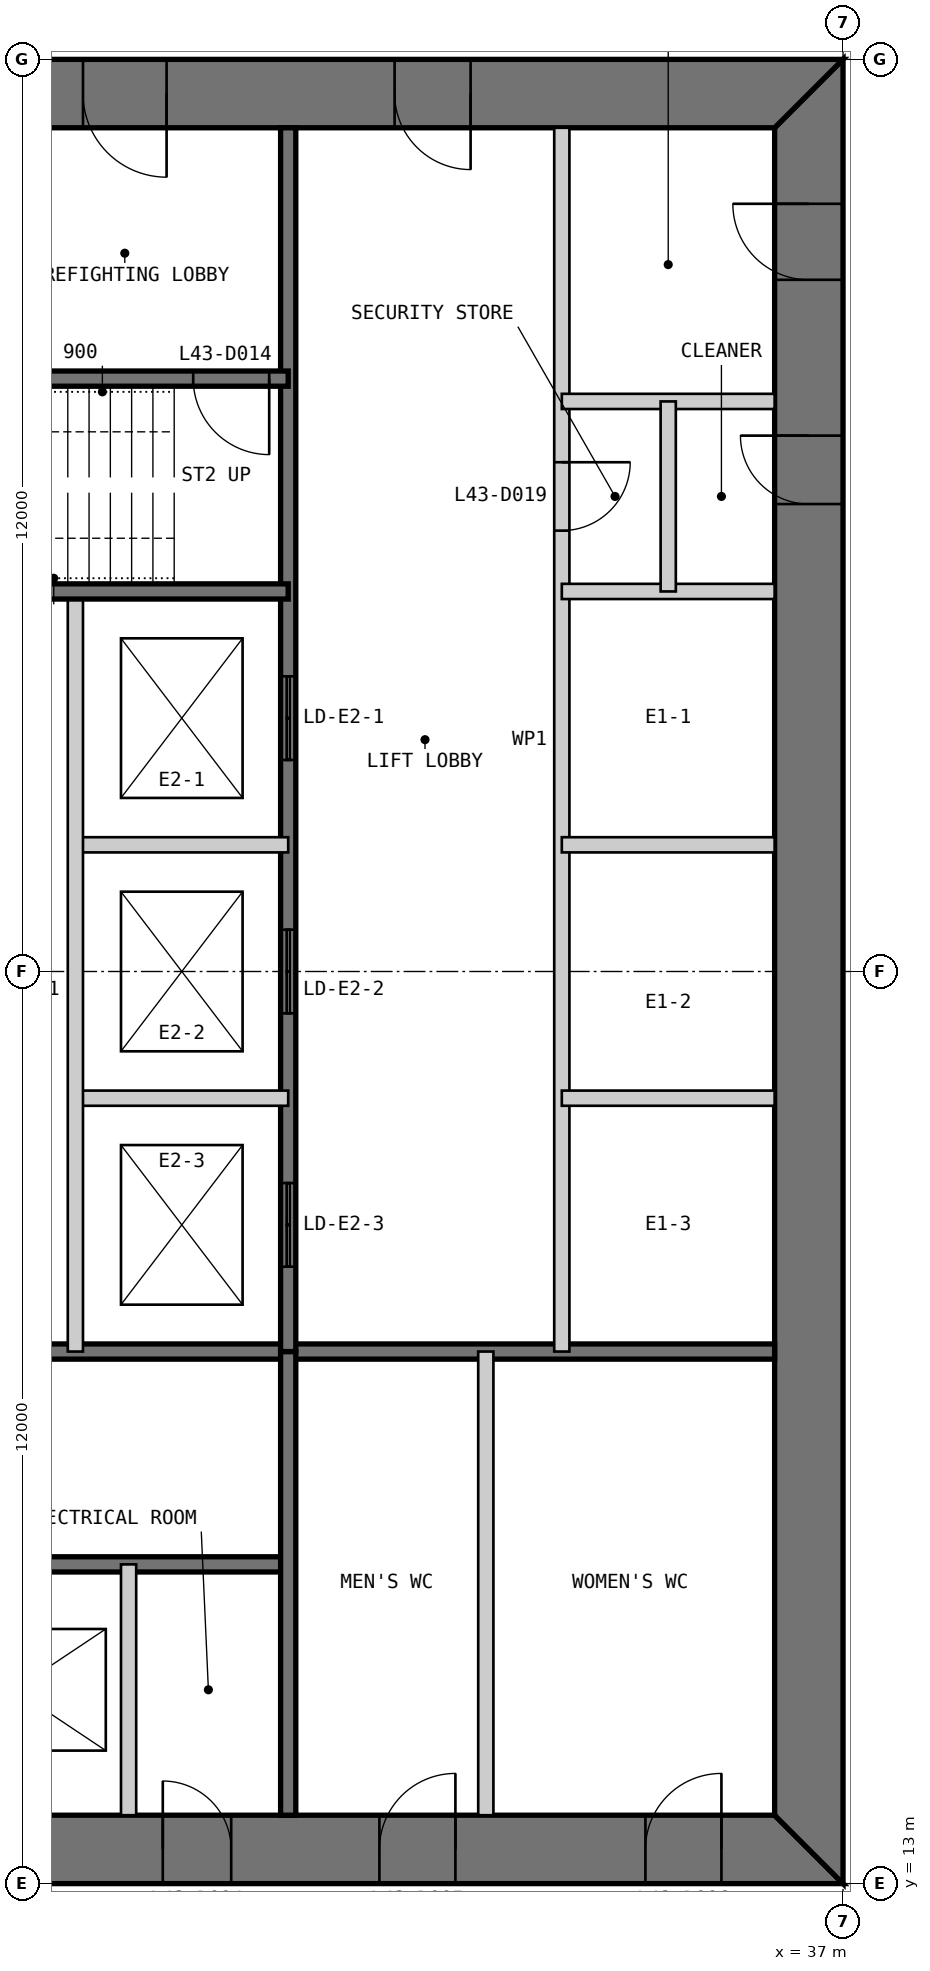
"""IFC4 building model, lengths in metres.
Left out: names, types, materials, properties, quantities, classifications, styles, units other than length and angle.
Written with IfcOpenShell. Run it as: python <this file> out.ifc"""

import sys

from ifc_helpers import new_model, si_unit, direction, frame, frame_2d, origin, place, context, subcontext, project, spatial, polyline, rectangle, outline, extrude, element, fill, save


model = new_model("IFC4")
c1 = context("Model", 3, precision=1e-05, world=origin(), true_north=direction((0.0, 1.0)))
c2 = subcontext(c1, "Body", "Model", "MODEL_VIEW")
j1 = project(units=[si_unit("LENGTHUNIT", "METRE"), si_unit("PLANEANGLEUNIT", "RADIAN")], contexts=[c1])
p1 = place(None, origin())
s1 = spatial("IfcSite", under=j1, at=p1, CompositionType="ELEMENT")
p2 = place(p1, origin())
s2 = spatial("IfcBuilding", under=s1, at=p2, CompositionType="ELEMENT")
p3 = place(p2, frame((0.0, 0.0, 185.8)))
s3 = spatial("IfcBuildingStorey", under=s2, at=p3, CompositionType="ELEMENT", Elevation=185.8)
p4 = place(p3, frame((13.0, 13.45, 0.0), z_axis=(0.0, 0.0, 1.0), x_axis=(1.0, 0.0, 0.0)))
e1 = element("IfcWall", 1, at=p4, inside=s3, PredefinedType="SHEAR", context=c2, shape_type="SweptSolid", body=[
    extrude(outline(polyline([(0.0, -0.45), (24.0, -0.45), (23.1, 0.45), (0.9, 0.45), (0.0, -0.45)])), origin(), (0.0, 0.0, 1.0), 4.0),
])
p5 = place(p4, frame((4.9, 0.0, 0.0)))
e2 = element("IfcOpeningElement", 2, at=p5, cuts=e1, PredefinedType="OPENING", context=c2, shape_type="SweptSolid", body=[
    extrude(rectangle(XDim=1.0, YDim=2.2, at=frame_2d((0.5, 1.1))), frame((0.0, 0.46, 0.0), z_axis=(0.0, -1.0, 0.0), x_axis=(1.0, 0.0, 0.0)), (0.0, 0.0, 1.0), 0.92),
])
p6 = place(p4, frame((8.9, 0.0, 0.0)))
e3 = element("IfcOpeningElement", 3, at=p6, cuts=e1, PredefinedType="OPENING", context=c2, shape_type="SweptSolid", body=[
    extrude(rectangle(XDim=1.1, YDim=2.2, at=frame_2d((0.55, 1.1))), frame((0.0, 0.46, 0.0), z_axis=(0.0, -1.0, 0.0), x_axis=(1.0, 0.0, 0.0)), (0.0, 0.0, 1.0), 0.92),
])
p7 = place(p4, frame((15.05, 0.0, 0.0)))
e4 = element("IfcOpeningElement", 4, at=p7, cuts=e1, PredefinedType="OPENING", context=c2, shape_type="SweptSolid", body=[
    extrude(rectangle(XDim=0.9, YDim=2.2, at=frame_2d((0.45, 1.1))), frame((0.0, 0.46, 0.0), z_axis=(0.0, -1.0, 0.0), x_axis=(1.0, 0.0, 0.0)), (0.0, 0.0, 1.0), 0.92),
])
p8 = place(p4, frame((17.9, 0.0, 0.0)))
e5 = element("IfcOpeningElement", 5, at=p8, cuts=e1, PredefinedType="OPENING", context=c2, shape_type="SweptSolid", body=[
    extrude(rectangle(XDim=1.0, YDim=2.2, at=frame_2d((0.5, 1.1))), frame((0.0, 0.46, 0.0), z_axis=(0.0, -1.0, 0.0), x_axis=(1.0, 0.0, 0.0)), (0.0, 0.0, 1.0), 0.92),
])
p9 = place(p4, frame((21.4, 0.0, 0.0)))
e6 = element("IfcOpeningElement", 6, at=p9, cuts=e1, PredefinedType="OPENING", context=c2, shape_type="SweptSolid", body=[
    extrude(rectangle(XDim=1.0, YDim=2.2, at=frame_2d((0.5, 1.1))), frame((0.0, 0.46, 0.0), z_axis=(0.0, -1.0, 0.0), x_axis=(1.0, 0.0, 0.0)), (0.0, 0.0, 1.0), 0.92),
])
p10 = place(p3, frame((36.55, 13.9, 0.0), z_axis=(0.0, 0.0, 1.0), x_axis=(0.0, 1.0, 0.0)))
e7 = element("IfcWall", 7, at=p10, inside=s3, PredefinedType="SHEAR", context=c2, shape_type="SweptSolid", body=[
    extrude(outline(polyline([(-0.9, -0.45), (23.1, -0.45), (22.2, 0.45), (0.0, 0.45), (-0.9, -0.45)])), origin(), (0.0, 0.0, 1.0), 4.0),
])
p11 = place(p10, frame((20.2, 0.0, 0.0)))
e8 = element("IfcOpeningElement", 8, at=p11, cuts=e7, PredefinedType="OPENING", context=c2, shape_type="SweptSolid", body=[
    extrude(rectangle(XDim=1.0, YDim=2.2, at=frame_2d((0.5, 1.1))), frame((0.0, 0.46, 0.0), z_axis=(0.0, -1.0, 0.0), x_axis=(1.0, 0.0, 0.0)), (0.0, 0.0, 1.0), 0.92),
])
p12 = place(p10, frame((17.25, 0.0, 0.0)))
e9 = element("IfcOpeningElement", 9, at=p12, cuts=e7, PredefinedType="OPENING", context=c2, shape_type="SweptSolid", body=[
    extrude(rectangle(XDim=0.9, YDim=2.2, at=frame_2d((0.45, 1.1))), frame((0.0, 0.46, 0.0), z_axis=(0.0, -1.0, 0.0), x_axis=(1.0, 0.0, 0.0)), (0.0, 0.0, 1.0), 0.92),
])
p13 = place(p3, frame((37.0, 36.55, 0.0), z_axis=(0.0, 0.0, 1.0), x_axis=(-1.0, 0.0, 0.0)))
e10 = element("IfcWall", 10, at=p13, inside=s3, PredefinedType="SHEAR", context=c2, shape_type="SweptSolid", body=[
    extrude(outline(polyline([(0.0, -0.45), (24.0, -0.45), (23.1, 0.45), (0.9, 0.45), (0.0, -0.45)])), origin(), (0.0, 0.0, 1.0), 4.0),
])
p14 = place(p13, frame((4.9, 0.0, 0.0)))
e11 = element("IfcOpeningElement", 11, at=p14, cuts=e10, PredefinedType="OPENING", context=c2, shape_type="SweptSolid", body=[
    extrude(rectangle(XDim=1.0, YDim=2.2, at=frame_2d((0.5, 1.1))), frame((0.0, 0.46, 0.0), z_axis=(0.0, -1.0, 0.0), x_axis=(1.0, 0.0, 0.0)), (0.0, 0.0, 1.0), 0.92),
])
p15 = place(p13, frame((8.9, 0.0, 0.0)))
e12 = element("IfcOpeningElement", 12, at=p15, cuts=e10, PredefinedType="OPENING", context=c2, shape_type="SweptSolid", body=[
    extrude(rectangle(XDim=1.1, YDim=2.2, at=frame_2d((0.55, 1.1))), frame((0.0, 0.46, 0.0), z_axis=(0.0, -1.0, 0.0), x_axis=(1.0, 0.0, 0.0)), (0.0, 0.0, 1.0), 0.92),
])
p16 = place(p13, frame((15.05, 0.0, 0.0)))
e13 = element("IfcOpeningElement", 13, at=p16, cuts=e10, PredefinedType="OPENING", context=c2, shape_type="SweptSolid", body=[
    extrude(rectangle(XDim=0.9, YDim=2.2, at=frame_2d((0.45, 1.1))), frame((0.0, 0.46, 0.0), z_axis=(0.0, -1.0, 0.0), x_axis=(1.0, 0.0, 0.0)), (0.0, 0.0, 1.0), 0.92),
])
p17 = place(p13, frame((17.9, 0.0, 0.0)))
e14 = element("IfcOpeningElement", 14, at=p17, cuts=e10, PredefinedType="OPENING", context=c2, shape_type="SweptSolid", body=[
    extrude(rectangle(XDim=1.0, YDim=2.2, at=frame_2d((0.5, 1.1))), frame((0.0, 0.46, 0.0), z_axis=(0.0, -1.0, 0.0), x_axis=(1.0, 0.0, 0.0)), (0.0, 0.0, 1.0), 0.92),
])
p18 = place(p13, frame((21.4, 0.0, 0.0)))
e15 = element("IfcOpeningElement", 15, at=p18, cuts=e10, PredefinedType="OPENING", context=c2, shape_type="SweptSolid", body=[
    extrude(rectangle(XDim=1.0, YDim=2.2, at=frame_2d((0.5, 1.1))), frame((0.0, 0.46, 0.0), z_axis=(0.0, -1.0, 0.0), x_axis=(1.0, 0.0, 0.0)), (0.0, 0.0, 1.0), 0.92),
])
p19 = place(p3, frame((20.3, 17.2, 0.0), z_axis=(0.0, 0.0, 1.0), x_axis=(1.0, 0.0, 0.0)))
e16 = element("IfcWall", 16, at=p19, inside=s3, PredefinedType="SOLIDWALL", context=c2, shape_type="SweptSolid", body=[
    extrude(rectangle(XDim=9.4, YDim=0.2, at=frame_2d((4.7, 0.0))), origin(), (0.0, 0.0, 1.0), 3.8),
])
p20 = place(p19, frame((0.25, 0.0, 0.0)))
e17 = element("IfcOpeningElement", 17, at=p20, cuts=e16, PredefinedType="OPENING", context=c2, shape_type="SweptSolid", body=[
    extrude(rectangle(XDim=1.0, YDim=2.2, at=frame_2d((0.5, 1.1))), frame((0.0, 0.11, 0.0), z_axis=(0.0, -1.0, 0.0), x_axis=(1.0, 0.0, 0.0)), (0.0, 0.0, 1.0), 0.22),
])
p21 = place(p3, frame((20.3, 20.0, 0.0), z_axis=(0.0, 0.0, 1.0), x_axis=(1.0, 0.0, 0.0)))
e18 = element("IfcWall", 18, at=p21, inside=s3, PredefinedType="SOLIDWALL", context=c2, shape_type="SweptSolid", body=[
    extrude(rectangle(XDim=15.8, YDim=0.2, at=frame_2d((7.9, 0.0))), origin(), (0.0, 0.0, 1.0), 3.8),
])
p22 = place(p3, frame((27.6, 13.9, 0.0), z_axis=(0.0, 0.0, 1.0), x_axis=(0.0, 1.0, 0.0)))
e19 = element("IfcWall", 19, at=p22, inside=s3, PredefinedType="PARTITIONING", context=c2, shape_type="SweptSolid", body=[
    extrude(rectangle(XDim=3.3, YDim=0.2, at=frame_2d((1.65, 0.0))), origin(), (0.0, 0.0, 1.0), 3.8),
])
p23 = place(p3, frame((29.7, 13.9, 0.0), z_axis=(0.0, 0.0, 1.0), x_axis=(0.0, 1.0, 0.0)))
e20 = element("IfcWall", 20, at=p23, inside=s3, PredefinedType="SOLIDWALL", context=c2, shape_type="SweptSolid", body=[
    extrude(rectangle(XDim=6.1, YDim=0.2, at=frame_2d((3.05, 0.0))), origin(), (0.0, 0.0, 1.0), 3.8),
])
p24 = place(p3, frame((32.3, 13.9, 0.0), z_axis=(0.0, 0.0, 1.0), x_axis=(0.0, 1.0, 0.0)))
e21 = element("IfcWall", 21, at=p24, inside=s3, PredefinedType="PARTITIONING", context=c2, shape_type="SweptSolid", body=[
    extrude(rectangle(XDim=6.1, YDim=0.2, at=frame_2d((3.05, 0.0))), origin(), (0.0, 0.0, 1.0), 3.8),
])
p25 = place(p3, frame((33.3, 36.1, 0.0), z_axis=(0.0, 0.0, 1.0), x_axis=(0.0, -1.0, 0.0)))
e22 = element("IfcWall", 22, at=p25, inside=s3, PredefinedType="PARTITIONING", context=c2, shape_type="SweptSolid", body=[
    extrude(rectangle(XDim=16.1, YDim=0.2, at=frame_2d((8.05, 0.0))), origin(), (0.0, 0.0, 1.0), 3.8),
])
p26 = place(p25, frame((4.4, 0.0, 0.0)))
e23 = element("IfcOpeningElement", 23, at=p26, cuts=e22, PredefinedType="OPENING", context=c2, shape_type="SweptSolid", body=[
    extrude(rectangle(XDim=0.9, YDim=2.2, at=frame_2d((0.45, 1.1))), frame((0.0, 0.11, 0.0), z_axis=(0.0, -1.0, 0.0), x_axis=(1.0, 0.0, 0.0)), (0.0, 0.0, 1.0), 0.22),
])
p27 = place(p3, frame((29.7, 36.1, 0.0), z_axis=(0.0, 0.0, 1.0), x_axis=(0.0, -1.0, 0.0)))
e24 = element("IfcWall", 24, at=p27, inside=s3, PredefinedType="SOLIDWALL", context=c2, shape_type="SweptSolid", body=[
    extrude(rectangle(XDim=16.1, YDim=0.2, at=frame_2d((8.05, 0.0))), origin(), (0.0, 0.0, 1.0), 3.8),
])
p28 = place(p27, frame((7.217, 0.0, 0.0)))
e25 = element("IfcOpeningElement", 25, at=p28, cuts=e24, PredefinedType="OPENING", context=c2, shape_type="SweptSolid", body=[
    extrude(rectangle(XDim=1.1, YDim=2.2, at=frame_2d((0.55, 1.1))), frame((0.0, 0.11, 0.0), z_axis=(0.0, -1.0, 0.0), x_axis=(1.0, 0.0, 0.0)), (0.0, 0.0, 1.0), 0.22),
])
p29 = place(p27, frame((10.55, 0.0, 0.0)))
e26 = element("IfcOpeningElement", 26, at=p29, cuts=e24, PredefinedType="OPENING", context=c2, shape_type="SweptSolid", body=[
    extrude(rectangle(XDim=1.1, YDim=2.2, at=frame_2d((0.55, 1.1))), frame((0.0, 0.11, 0.0), z_axis=(0.0, -1.0, 0.0), x_axis=(1.0, 0.0, 0.0)), (0.0, 0.0, 1.0), 0.22),
])
p30 = place(p27, frame((13.883, 0.0, 0.0)))
e27 = element("IfcOpeningElement", 27, at=p30, cuts=e24, PredefinedType="OPENING", context=c2, shape_type="SweptSolid", body=[
    extrude(rectangle(XDim=1.1, YDim=2.2, at=frame_2d((0.55, 1.1))), frame((0.0, 0.11, 0.0), z_axis=(0.0, -1.0, 0.0), x_axis=(1.0, 0.0, 0.0)), (0.0, 0.0, 1.0), 0.22),
])
for number, where, z_axis, x_axis in (
    (28, (36.1, 30.0, 0.0), (0.0, 0.0, 1.0), (-1.0, 0.0, 0.0)),
    (29, (36.1, 26.667, 0.0), (0.0, 0.0, 1.0), (-1.0, 0.0, 0.0)),
    (30, (36.1, 23.333, 0.0), (0.0, 0.0, 1.0), (-1.0, 0.0, 0.0)),
    (31, (29.7, 26.667, 0.0), (0.0, 0.0, 1.0), (-1.0, 0.0, 0.0)),
    (32, (29.7, 23.333, 0.0), (0.0, 0.0, 1.0), (-1.0, 0.0, 0.0)),
):
    element("IfcWall", number, at=place(p3, frame(where, z_axis=z_axis, x_axis=x_axis)), inside=s3, PredefinedType="PARTITIONING", context=c2, shape_type="SweptSolid", body=[
        extrude(rectangle(XDim=2.8, YDim=0.2, at=frame_2d((1.4, 0.0))), origin(), (0.0, 0.0, 1.0), 3.8),
    ])
p31 = place(p3, frame((26.9, 30.0, 0.0), z_axis=(0.0, 0.0, 1.0), x_axis=(0.0, -1.0, 0.0)))
e33 = element("IfcWall", 33, at=p31, inside=s3, PredefinedType="PARTITIONING", context=c2, shape_type="SweptSolid", body=[
    extrude(rectangle(XDim=10.0, YDim=0.2, at=frame_2d((5.0, 0.0))), origin(), (0.0, 0.0, 1.0), 3.8),
])
p32 = place(p3, frame((29.7, 32.8, 0.0), z_axis=(0.0, 0.0, 1.0), x_axis=(-1.0, 0.0, 0.0)))
e34 = element("IfcWall", 34, at=p32, inside=s3, PredefinedType="SOLIDWALL", context=c2, shape_type="SweptSolid", body=[
    extrude(rectangle(XDim=9.4, YDim=0.2, at=frame_2d((4.7, 0.0))), origin(), (0.0, 0.0, 1.0), 3.8),
])
p33 = place(p32, frame((0.25, 0.0, 0.0)))
e35 = element("IfcOpeningElement", 35, at=p33, cuts=e34, PredefinedType="OPENING", context=c2, shape_type="SweptSolid", body=[
    extrude(rectangle(XDim=1.0, YDim=2.2, at=frame_2d((0.5, 1.1))), frame((0.0, 0.11, 0.0), z_axis=(0.0, -1.0, 0.0), x_axis=(1.0, 0.0, 0.0)), (0.0, 0.0, 1.0), 0.22),
])
p34 = place(p3, frame((29.7, 30.0, 0.0), z_axis=(0.0, 0.0, 1.0), x_axis=(-1.0, 0.0, 0.0)))
e36 = element("IfcWall", 36, at=p34, inside=s3, PredefinedType="SOLIDWALL", context=c2, shape_type="SweptSolid", body=[
    extrude(rectangle(XDim=15.8, YDim=0.2, at=frame_2d((7.9, 0.0))), origin(), (0.0, 0.0, 1.0), 3.8),
])
p35 = place(p3, frame((36.1, 32.5, 0.0), z_axis=(0.0, 0.0, 1.0), x_axis=(-1.0, 0.0, 0.0)))
e37 = element("IfcWall", 37, at=p35, inside=s3, PredefinedType="PARTITIONING", context=c2, shape_type="SweptSolid", body=[
    extrude(rectangle(XDim=2.8, YDim=0.2, at=frame_2d((1.4, 0.0))), origin(), (0.0, 0.0, 1.0), 3.8),
])
p36 = place(p3, frame((34.7, 32.5, 0.0), z_axis=(0.0, 0.0, 1.0), x_axis=(0.0, -1.0, 0.0)))
e38 = element("IfcWall", 38, at=p36, inside=s3, PredefinedType="PARTITIONING", context=c2, shape_type="SweptSolid", body=[
    extrude(rectangle(XDim=2.5, YDim=0.2, at=frame_2d((1.25, 0.0))), origin(), (0.0, 0.0, 1.0), 3.8),
])
p37 = place(p7, origin())
e39 = element("IfcDoor", 39, at=p37, inside=s3, OperationType="SINGLE_SWING_LEFT", PredefinedType="DOOR", context=c2, shape_type="SweptSolid", body=[
    extrude(rectangle(XDim=0.9, YDim=2.2, at=frame_2d((0.45, 1.1))), frame((0.0, 0.025, 0.0), z_axis=(0.0, -1.0, 0.0), x_axis=(1.0, 0.0, 0.0)), (0.0, 0.0, 1.0), 0.05),
    extrude(outline(polyline([(0.0, 0.0), (0.04, 0.0), (0.04, 2.16), (0.86, 2.16), (0.86, 0.0), (0.9, 0.0), (0.9, 2.2), (0.0, 2.2), (0.0, 0.0)])), frame((0.0, 0.3, 0.0), z_axis=(0.0, -1.0, 0.0), x_axis=(1.0, 0.0, 0.0)), (0.0, 0.0, 1.0), 0.6),
])
fill(e4, e39)
p38 = place(p8, origin())
e40 = element("IfcDoor", 40, at=p38, inside=s3, OperationType="SINGLE_SWING_RIGHT", PredefinedType="DOOR", context=c2, shape_type="SweptSolid", body=[
    extrude(rectangle(XDim=1.0, YDim=2.2, at=frame_2d((0.5, 1.1))), frame((0.0, 0.025, 0.0), z_axis=(0.0, -1.0, 0.0), x_axis=(1.0, 0.0, 0.0)), (0.0, 0.0, 1.0), 0.05),
    extrude(outline(polyline([(0.0, 0.0), (0.04, 0.0), (0.04, 2.16), (0.96, 2.16), (0.96, 0.0), (1.0, 0.0), (1.0, 2.2), (0.0, 2.2), (0.0, 0.0)])), frame((0.0, 0.3, 0.0), z_axis=(0.0, -1.0, 0.0), x_axis=(1.0, 0.0, 0.0)), (0.0, 0.0, 1.0), 0.6),
])
fill(e5, e40)
p39 = place(p9, origin())
e41 = element("IfcDoor", 41, at=p39, inside=s3, OperationType="SINGLE_SWING_RIGHT", PredefinedType="DOOR", context=c2, shape_type="SweptSolid", body=[
    extrude(rectangle(XDim=1.0, YDim=2.2, at=frame_2d((0.5, 1.1))), frame((0.0, 0.025, 0.0), z_axis=(0.0, -1.0, 0.0), x_axis=(1.0, 0.0, 0.0)), (0.0, 0.0, 1.0), 0.05),
    extrude(outline(polyline([(0.0, 0.0), (0.04, 0.0), (0.04, 2.16), (0.96, 2.16), (0.96, 0.0), (1.0, 0.0), (1.0, 2.2), (0.0, 2.2), (0.0, 0.0)])), frame((0.0, 0.3, 0.0), z_axis=(0.0, -1.0, 0.0), x_axis=(1.0, 0.0, 0.0)), (0.0, 0.0, 1.0), 0.6),
])
fill(e6, e41)
p40 = place(p14, origin())
e42 = element("IfcDoor", 42, at=p40, inside=s3, OperationType="SINGLE_SWING_LEFT", PredefinedType="DOOR", context=c2, shape_type="SweptSolid", body=[
    extrude(rectangle(XDim=1.0, YDim=2.2, at=frame_2d((0.5, 1.1))), frame((0.0, 0.025, 0.0), z_axis=(0.0, -1.0, 0.0), x_axis=(1.0, 0.0, 0.0)), (0.0, 0.0, 1.0), 0.05),
    extrude(outline(polyline([(0.0, 0.0), (0.04, 0.0), (0.04, 2.16), (0.96, 2.16), (0.96, 0.0), (1.0, 0.0), (1.0, 2.2), (0.0, 2.2), (0.0, 0.0)])), frame((0.0, 0.3, 0.0), z_axis=(0.0, -1.0, 0.0), x_axis=(1.0, 0.0, 0.0)), (0.0, 0.0, 1.0), 0.6),
])
fill(e11, e42)
p41 = place(p15, origin())
e43 = element("IfcDoor", 43, at=p41, inside=s3, OperationType="SINGLE_SWING_LEFT", PredefinedType="DOOR", context=c2, shape_type="SweptSolid", body=[
    extrude(rectangle(XDim=1.1, YDim=2.2, at=frame_2d((0.55, 1.1))), frame((0.0, 0.025, 0.0), z_axis=(0.0, -1.0, 0.0), x_axis=(1.0, 0.0, 0.0)), (0.0, 0.0, 1.0), 0.05),
    extrude(outline(polyline([(0.0, 0.0), (0.04, 0.0), (0.04, 2.16), (1.06, 2.16), (1.06, 0.0), (1.1, 0.0), (1.1, 2.2), (0.0, 2.2), (0.0, 0.0)])), frame((0.0, 0.3, 0.0), z_axis=(0.0, -1.0, 0.0), x_axis=(1.0, 0.0, 0.0)), (0.0, 0.0, 1.0), 0.6),
])
fill(e12, e43)
p42 = place(p33, origin())
e44 = element("IfcDoor", 44, at=p42, inside=s3, OperationType="SINGLE_SWING_LEFT", PredefinedType="DOOR", context=c2, shape_type="SweptSolid", body=[
    extrude(rectangle(XDim=1.0, YDim=2.2, at=frame_2d((0.5, 1.1))), frame((0.0, 0.025, 0.0), z_axis=(0.0, -1.0, 0.0), x_axis=(1.0, 0.0, 0.0)), (0.0, 0.0, 1.0), 0.05),
])
fill(e35, e44)
p43 = place(p11, origin())
e45 = element("IfcDoor", 45, at=p43, inside=s3, OperationType="SINGLE_SWING_RIGHT", PredefinedType="DOOR", context=c2, shape_type="SweptSolid", body=[
    extrude(rectangle(XDim=1.0, YDim=2.2, at=frame_2d((0.5, 1.1))), frame((0.0, 0.025, 0.0), z_axis=(0.0, -1.0, 0.0), x_axis=(1.0, 0.0, 0.0)), (0.0, 0.0, 1.0), 0.05),
    extrude(outline(polyline([(0.0, 0.0), (0.04, 0.0), (0.04, 2.16), (0.96, 2.16), (0.96, 0.0), (1.0, 0.0), (1.0, 2.2), (0.0, 2.2), (0.0, 0.0)])), frame((0.0, 0.3, 0.0), z_axis=(0.0, -1.0, 0.0), x_axis=(1.0, 0.0, 0.0)), (0.0, 0.0, 1.0), 0.6),
])
fill(e8, e45)
p44 = place(p26, origin())
e46 = element("IfcDoor", 46, at=p44, inside=s3, OperationType="SINGLE_SWING_LEFT", PredefinedType="DOOR", context=c2, shape_type="SweptSolid", body=[
    extrude(rectangle(XDim=0.9, YDim=2.2, at=frame_2d((0.45, 1.1))), frame((0.0, 0.025, 0.0), z_axis=(0.0, -1.0, 0.0), x_axis=(1.0, 0.0, 0.0)), (0.0, 0.0, 1.0), 0.05),
])
fill(e23, e46)
p45 = place(p12, origin())
e47 = element("IfcDoor", 47, at=p45, inside=s3, OperationType="SINGLE_SWING_RIGHT", PredefinedType="DOOR", context=c2, shape_type="SweptSolid", body=[
    extrude(rectangle(XDim=0.9, YDim=2.2, at=frame_2d((0.45, 1.1))), frame((0.0, 0.025, 0.0), z_axis=(0.0, -1.0, 0.0), x_axis=(1.0, 0.0, 0.0)), (0.0, 0.0, 1.0), 0.05),
    extrude(outline(polyline([(0.0, 0.0), (0.04, 0.0), (0.04, 2.16), (0.86, 2.16), (0.86, 0.0), (0.9, 0.0), (0.9, 2.2), (0.0, 2.2), (0.0, 0.0)])), frame((0.0, 0.3, 0.0), z_axis=(0.0, -1.0, 0.0), x_axis=(1.0, 0.0, 0.0)), (0.0, 0.0, 1.0), 0.6),
])
fill(e9, e47)
p46 = place(p28, origin())
e48 = element("IfcDoor", 48, at=p46, inside=s3, OperationType="DOUBLE_DOOR_SLIDING", PredefinedType="DOOR", context=c2, shape_type="SweptSolid", body=[
    extrude(rectangle(XDim=1.1, YDim=2.2, at=frame_2d((0.55, 1.1))), frame((0.0, 0.025, 0.0), z_axis=(0.0, -1.0, 0.0), x_axis=(1.0, 0.0, 0.0)), (0.0, 0.0, 1.0), 0.05),
])
fill(e25, e48)
p47 = place(p29, origin())
e49 = element("IfcDoor", 49, at=p47, inside=s3, OperationType="DOUBLE_DOOR_SLIDING", PredefinedType="DOOR", context=c2, shape_type="SweptSolid", body=[
    extrude(rectangle(XDim=1.1, YDim=2.2, at=frame_2d((0.55, 1.1))), frame((0.0, 0.025, 0.0), z_axis=(0.0, -1.0, 0.0), x_axis=(1.0, 0.0, 0.0)), (0.0, 0.0, 1.0), 0.05),
])
fill(e26, e49)
p48 = place(p30, origin())
e50 = element("IfcDoor", 50, at=p48, inside=s3, OperationType="DOUBLE_DOOR_SLIDING", PredefinedType="DOOR", context=c2, shape_type="SweptSolid", body=[
    extrude(rectangle(XDim=1.1, YDim=2.2, at=frame_2d((0.55, 1.1))), frame((0.0, 0.025, 0.0), z_axis=(0.0, -1.0, 0.0), x_axis=(1.0, 0.0, 0.0)), (0.0, 0.0, 1.0), 0.05),
])
fill(e27, e50)
save(model, sys.argv[1])
